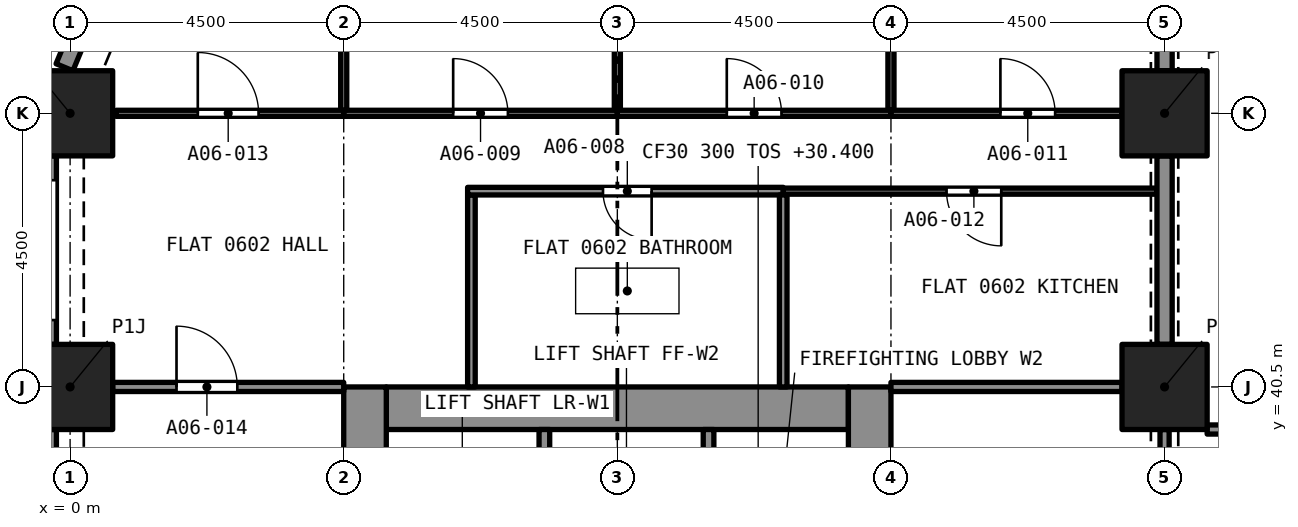
"""IFC4 building model, lengths in metres.
Left out: names, types, materials, properties, quantities, classifications, styles, units other than length and angle.
Written with IfcOpenShell. Run it as: python <this file> out.ifc"""

import sys

from ifc_helpers import new_model, si_unit, direction, frame, frame_2d, origin, origin_2d, place, context, subcontext, project, spatial, rectangle, extrude, element, fill, save


model = new_model("IFC4")
c1 = context("Model", 3, precision=1e-05, world=origin(), true_north=direction((0.0, 1.0)))
c2 = subcontext(c1, "Body", "Model", "MODEL_VIEW")
j1 = project(units=[si_unit("LENGTHUNIT", "METRE"), si_unit("PLANEANGLEUNIT", "RADIAN")], contexts=[c1])
p1 = place(None, origin())
s1 = spatial("IfcSite", under=j1, at=p1, CompositionType="ELEMENT")
p2 = place(p1, origin())
s2 = spatial("IfcBuilding", under=s1, at=p2, CompositionType="ELEMENT")
p3 = place(p2, frame((0.0, 0.0, 30.4)))
s3 = spatial("IfcBuildingStorey", under=s2, at=p3, CompositionType="ELEMENT", Elevation=30.4)
for number, where, z_axis, x_axis in (
    (1, (0.0, 40.5, 0.0), (0.0, 0.0, 1.0), (1.0, 0.0, 0.0)),
    (2, (18.0, 40.5, 0.0), (0.0, 0.0, 1.0), (1.0, 0.0, 0.0)),
    (3, (0.0, 45.0, 0.0), (0.0, 0.0, 1.0), (1.0, 0.0, 0.0)),
    (4, (18.0, 45.0, 0.0), (0.0, 0.0, 1.0), (1.0, 0.0, 0.0)),
):
    element("IfcColumn", number, at=place(p3, frame(where, z_axis=z_axis, x_axis=x_axis)), inside=s3, PredefinedType="COLUMN", context=c2, shape_type="SweptSolid", body=[
        extrude(rectangle(XDim=1.4, YDim=1.4, at=origin_2d()), origin(), (0.0, 0.0, 1.0), 3.2),
    ])
p4 = place(p3, frame((5.2, 40.15, 0.0), z_axis=(0.0, 0.0, 1.0), x_axis=(1.0, 0.0, 0.0)))
e5 = element("IfcWall", 5, at=p4, inside=s3, PredefinedType="SOLIDWALL", context=c2, shape_type="SweptSolid", body=[
    extrude(rectangle(XDim=7.6, YDim=0.7, at=frame_2d((3.8, 0.0))), origin(), (0.0, 0.0, 1.0), 3.2),
])
p5 = place(p3, frame((4.85, 27.0, 0.0), z_axis=(0.0, 0.0, 1.0), x_axis=(0.0, 1.0, 0.0)))
e6 = element("IfcWall", 6, at=p5, inside=s3, PredefinedType="SOLIDWALL", context=c2, shape_type="SweptSolid", body=[
    extrude(rectangle(XDim=13.5, YDim=0.7, at=frame_2d((6.75, 0.0))), origin(), (0.0, 0.0, 1.0), 3.2),
])
p6 = place(p5, frame((8.95, 0.0, 0.0)))
e7 = element("IfcOpeningElement", 7, at=p6, cuts=e6, PredefinedType="OPENING", context=c2, shape_type="SweptSolid", body=[
    extrude(rectangle(XDim=1.2, YDim=2.1, at=frame_2d((0.6, 1.05))), frame((0.0, 0.36, 0.0), z_axis=(0.0, -1.0, 0.0), x_axis=(1.0, 0.0, 0.0)), (0.0, 0.0, 1.0), 0.72),
])
p7 = place(p3, frame((13.15, 27.0, 0.0), z_axis=(0.0, 0.0, 1.0), x_axis=(0.0, 1.0, 0.0)))
e8 = element("IfcWall", 8, at=p7, inside=s3, PredefinedType="SOLIDWALL", context=c2, shape_type="SweptSolid", body=[
    extrude(rectangle(XDim=13.5, YDim=0.7, at=frame_2d((6.75, 0.0))), origin(), (0.0, 0.0, 1.0), 3.2),
])
p8 = place(p7, frame((11.1, 0.0, 0.0)))
e9 = element("IfcOpeningElement", 9, at=p8, cuts=e8, PredefinedType="OPENING", context=c2, shape_type="SweptSolid", body=[
    extrude(rectangle(XDim=1.1, YDim=2.1, at=frame_2d((0.55, 1.05))), frame((0.0, 0.36, 0.0), z_axis=(0.0, -1.0, 0.0), x_axis=(1.0, 0.0, 0.0)), (0.0, 0.0, 1.0), 0.72),
])
p9 = place(p7, frame((8.95, 0.0, 0.0)))
e10 = element("IfcOpeningElement", 10, at=p9, cuts=e8, PredefinedType="OPENING", context=c2, shape_type="SweptSolid", body=[
    extrude(rectangle(XDim=1.2, YDim=2.1, at=frame_2d((0.6, 1.05))), frame((0.0, 0.36, 0.0), z_axis=(0.0, -1.0, 0.0), x_axis=(1.0, 0.0, 0.0)), (0.0, 0.0, 1.0), 0.72),
])
p10 = place(p3, frame((-0.092, 45.757, 0.0), z_axis=(0.0, 0.0, 1.0), x_axis=(0.382737135771, 0.923857286003, 0.0)))
e11 = element("IfcWall", 11, at=p10, inside=s3, PredefinedType="SOLIDWALL", context=c2, shape_type="SweptSolid", body=[
    extrude(rectangle(XDim=1.865, YDim=0.3, at=frame_2d((0.933, 0.0))), origin(), (0.0, 0.0, 1.0), 3.2),
])
p11 = place(p10, frame((0.508, 0.0, 0.45)))
e12 = element("IfcOpeningElement", 12, at=p11, cuts=e11, PredefinedType="OPENING", context=c2, shape_type="SweptSolid", body=[
    extrude(rectangle(XDim=1.1, YDim=1.95, at=frame_2d((0.55, 0.975))), frame((0.0, 0.16, 0.0), z_axis=(0.0, -1.0, 0.0), x_axis=(1.0, 0.0, 0.0)), (0.0, 0.0, 1.0), 0.32),
])
p12 = place(p3, frame((-0.375, 41.2, 0.0), z_axis=(0.0, 0.0, 1.0), x_axis=(0.0, 1.0, 0.0)))
e13 = element("IfcWall", 13, at=p12, inside=s3, PredefinedType="SOLIDWALL", context=c2, shape_type="SweptSolid", body=[
    extrude(rectangle(XDim=3.1, YDim=0.3, at=frame_2d((1.55, 0.0))), origin(), (0.0, 0.0, 1.0), 3.2),
])
p13 = place(p12, frame((0.4, 0.0, 0.45)))
e14 = element("IfcOpeningElement", 14, at=p13, cuts=e13, PredefinedType="OPENING", context=c2, shape_type="SweptSolid", body=[
    extrude(rectangle(XDim=2.3, YDim=1.95, at=frame_2d((1.15, 0.975))), frame((0.0, 0.16, 0.0), z_axis=(0.0, -1.0, 0.0), x_axis=(1.0, 0.0, 0.0)), (0.0, 0.0, 1.0), 0.32),
])
p14 = place(p3, frame((-0.375, 36.7, 0.0), z_axis=(0.0, 0.0, 1.0), x_axis=(0.0, 1.0, 0.0)))
e15 = element("IfcWall", 15, at=p14, inside=s3, PredefinedType="SOLIDWALL", context=c2, shape_type="SweptSolid", body=[
    extrude(rectangle(XDim=3.1, YDim=0.3, at=frame_2d((1.55, 0.0))), origin(), (0.0, 0.0, 1.0), 3.2),
])
p15 = place(p14, frame((0.4, 0.0, 0.45)))
e16 = element("IfcOpeningElement", 16, at=p15, cuts=e15, PredefinedType="OPENING", context=c2, shape_type="SweptSolid", body=[
    extrude(rectangle(XDim=2.3, YDim=1.95, at=frame_2d((1.15, 0.975))), frame((0.0, 0.16, 0.0), z_axis=(0.0, -1.0, 0.0), x_axis=(1.0, 0.0, 0.0)), (0.0, 0.0, 1.0), 0.32),
])
p16 = place(p3, frame((6.6, 40.5, 0.0), z_axis=(0.0, 0.0, 1.0), x_axis=(0.0, 1.0, 0.0)))
e17 = element("IfcWall", 17, at=p16, inside=s3, PredefinedType="PARTITIONING", context=c2, shape_type="SweptSolid", body=[
    extrude(rectangle(XDim=3.157, YDim=0.125, at=frame_2d((1.579, 0.0))), origin(), (0.0, 0.0, 1.0), 2.9),
])
p17 = place(p3, frame((11.728, 43.72, 0.0), z_axis=(0.0, 0.0, 1.0), x_axis=(-1.0, 0.0, 0.0)))
e18 = element("IfcWall", 18, at=p17, inside=s3, PredefinedType="PARTITIONING", context=c2, shape_type="SweptSolid", body=[
    extrude(rectangle(XDim=5.19, YDim=0.125, at=frame_2d((2.595, 0.0))), origin(), (0.0, 0.0, 1.0), 2.9),
])
p18 = place(p17, frame((2.164, 0.0, 0.0)))
e19 = element("IfcOpeningElement", 19, at=p18, cuts=e18, PredefinedType="OPENING", context=c2, shape_type="SweptSolid", body=[
    extrude(rectangle(XDim=0.8, YDim=2.1, at=frame_2d((0.4, 1.05))), frame((0.0, 0.073, 0.0), z_axis=(0.0, -1.0, 0.0), x_axis=(1.0, 0.0, 0.0)), (0.0, 0.0, 1.0), 0.145),
])
p19 = place(p3, frame((11.728, 40.5, 0.0), z_axis=(0.0, 0.0, 1.0), x_axis=(0.0, 1.0, 0.0)))
e20 = element("IfcWall", 20, at=p19, inside=s3, PredefinedType="PARTITIONING", context=c2, shape_type="SweptSolid", body=[
    extrude(rectangle(XDim=3.157, YDim=0.125, at=frame_2d((1.579, 0.0))), origin(), (0.0, 0.0, 1.0), 2.9),
])
p20 = place(p3, frame((9.0, 45.05, 0.0), z_axis=(0.0, 0.0, 1.0), x_axis=(0.0, 1.0, 0.0)))
e21 = element("IfcWall", 21, at=p20, inside=s3, PredefinedType="PARTITIONING", context=c2, shape_type="SweptSolid", body=[
    extrude(rectangle(XDim=3.75, YDim=0.1, at=frame_2d((1.875, 0.0))), origin(), (0.0, 0.0, 1.0), 2.9),
])
p21 = place(p3, frame((4.5, 45.0, 0.0), z_axis=(0.0, 0.0, 1.0), x_axis=(1.0, 0.0, 0.0)))
e22 = element("IfcWall", 22, at=p21, inside=s3, PredefinedType="PARTITIONING", context=c2, shape_type="SweptSolid", body=[
    extrude(rectangle(XDim=4.5, YDim=0.1, at=frame_2d((2.25, 0.0))), origin(), (0.0, 0.0, 1.0), 2.9),
])
p22 = place(p21, frame((1.8, 0.0, 0.0)))
e23 = element("IfcOpeningElement", 23, at=p22, cuts=e22, PredefinedType="OPENING", context=c2, shape_type="SweptSolid", body=[
    extrude(rectangle(XDim=0.9, YDim=2.1, at=frame_2d((0.45, 1.05))), frame((0.0, 0.06, 0.0), z_axis=(0.0, -1.0, 0.0), x_axis=(1.0, 0.0, 0.0)), (0.0, 0.0, 1.0), 0.12),
])
p23 = place(p3, frame((4.5, 45.05, 0.0), z_axis=(0.0, 0.0, 1.0), x_axis=(0.0, 1.0, 0.0)))
e24 = element("IfcWall", 24, at=p23, inside=s3, PredefinedType="PARTITIONING", context=c2, shape_type="SweptSolid", body=[
    extrude(rectangle(XDim=3.692, YDim=0.1, at=frame_2d((1.846, 0.0))), origin(), (0.0, 0.0, 1.0), 2.9),
])
p24 = place(p3, frame((13.5, 45.05, 0.0), z_axis=(0.0, 0.0, 1.0), x_axis=(0.0, 1.0, 0.0)))
e25 = element("IfcWall", 25, at=p24, inside=s3, PredefinedType="PARTITIONING", context=c2, shape_type="SweptSolid", body=[
    extrude(rectangle(XDim=3.75, YDim=0.1, at=frame_2d((1.875, 0.0))), origin(), (0.0, 0.0, 1.0), 2.9),
])
p25 = place(p3, frame((9.0, 45.0, 0.0), z_axis=(0.0, 0.0, 1.0), x_axis=(1.0, 0.0, 0.0)))
e26 = element("IfcWall", 26, at=p25, inside=s3, PredefinedType="PARTITIONING", context=c2, shape_type="SweptSolid", body=[
    extrude(rectangle(XDim=4.5, YDim=0.1, at=frame_2d((2.25, 0.0))), origin(), (0.0, 0.0, 1.0), 2.9),
])
p26 = place(p25, frame((1.8, 0.0, 0.0)))
e27 = element("IfcOpeningElement", 27, at=p26, cuts=e26, PredefinedType="OPENING", context=c2, shape_type="SweptSolid", body=[
    extrude(rectangle(XDim=0.9, YDim=2.1, at=frame_2d((0.45, 1.05))), frame((0.0, 0.06, 0.0), z_axis=(0.0, -1.0, 0.0), x_axis=(1.0, 0.0, 0.0)), (0.0, 0.0, 1.0), 0.12),
])
p27 = place(p3, frame((13.5, 45.0, 0.0), z_axis=(0.0, 0.0, 1.0), x_axis=(1.0, 0.0, 0.0)))
e28 = element("IfcWall", 28, at=p27, inside=s3, PredefinedType="PARTITIONING", context=c2, shape_type="SweptSolid", body=[
    extrude(rectangle(XDim=3.8, YDim=0.1, at=frame_2d((1.9, 0.0))), origin(), (0.0, 0.0, 1.0), 2.9),
])
p28 = place(p27, frame((1.8, 0.0, 0.0)))
e29 = element("IfcOpeningElement", 29, at=p28, cuts=e28, PredefinedType="OPENING", context=c2, shape_type="SweptSolid", body=[
    extrude(rectangle(XDim=0.9, YDim=2.1, at=frame_2d((0.45, 1.05))), frame((0.0, 0.06, 0.0), z_axis=(0.0, -1.0, 0.0), x_axis=(1.0, 0.0, 0.0)), (0.0, 0.0, 1.0), 0.12),
])
p29 = place(p3, frame((18.0, 45.7, 0.0), z_axis=(0.0, 0.0, 1.0), x_axis=(0.0, 1.0, 0.0)))
e30 = element("IfcWall", 30, at=p29, inside=s3, PredefinedType="PARTITIONING", context=c2, shape_type="SweptSolid", body=[
    extrude(rectangle(XDim=3.1, YDim=0.25, at=frame_2d((1.55, 0.0))), origin(), (0.0, 0.0, 1.0), 2.38),
])
p30 = place(p3, frame((17.875, 43.72, 0.0), z_axis=(0.0, 0.0, 1.0), x_axis=(-1.0, 0.0, 0.0)))
e31 = element("IfcWall", 31, at=p30, inside=s3, PredefinedType="PARTITIONING", context=c2, shape_type="SweptSolid", body=[
    extrude(rectangle(XDim=6.147, YDim=0.1, at=frame_2d((3.073, 0.0))), origin(), (0.0, 0.0, 1.0), 2.9),
])
p31 = place(p30, frame((2.561, 0.0, 0.0)))
e32 = element("IfcOpeningElement", 32, at=p31, cuts=e31, PredefinedType="OPENING", context=c2, shape_type="SweptSolid", body=[
    extrude(rectangle(XDim=0.9, YDim=2.1, at=frame_2d((0.45, 1.05))), frame((0.0, 0.06, 0.0), z_axis=(0.0, -1.0, 0.0), x_axis=(1.0, 0.0, 0.0)), (0.0, 0.0, 1.0), 0.12),
])
p32 = place(p3, frame((0.758, 45.0, 0.0), z_axis=(0.0, 0.0, 1.0), x_axis=(1.0, 0.0, 0.0)))
e33 = element("IfcWall", 33, at=p32, inside=s3, PredefinedType="PARTITIONING", context=c2, shape_type="SweptSolid", body=[
    extrude(rectangle(XDim=3.742, YDim=0.1, at=frame_2d((1.871, 0.0))), origin(), (0.0, 0.0, 1.0), 2.9),
])
p33 = place(p32, frame((1.342, 0.0, 0.0)))
e34 = element("IfcOpeningElement", 34, at=p33, cuts=e33, PredefinedType="OPENING", context=c2, shape_type="SweptSolid", body=[
    extrude(rectangle(XDim=1.0, YDim=2.1, at=frame_2d((0.5, 1.05))), frame((0.0, 0.06, 0.0), z_axis=(0.0, -1.0, 0.0), x_axis=(1.0, 0.0, 0.0)), (0.0, 0.0, 1.0), 0.12),
])
p34 = place(p3, frame((0.7, 40.5, 0.0), z_axis=(0.0, 0.0, 1.0), x_axis=(1.0, 0.0, 0.0)))
e35 = element("IfcWall", 35, at=p34, inside=s3, PredefinedType="PARTITIONING", context=c2, shape_type="SweptSolid", body=[
    extrude(rectangle(XDim=3.8, YDim=0.15, at=frame_2d((1.9, 0.0))), origin(), (0.0, 0.0, 1.0), 2.9),
])
p35 = place(p34, frame((1.05, 0.0, 0.0)))
e36 = element("IfcOpeningElement", 36, at=p35, cuts=e35, PredefinedType="OPENING", context=c2, shape_type="SweptSolid", body=[
    extrude(rectangle(XDim=1.0, YDim=2.1, at=frame_2d((0.5, 1.05))), frame((0.0, 0.085, 0.0), z_axis=(0.0, -1.0, 0.0), x_axis=(1.0, 0.0, 0.0)), (0.0, 0.0, 1.0), 0.17),
])
p36 = place(p3, frame((18.0, 41.2, 0.0), z_axis=(0.0, 0.0, 1.0), x_axis=(0.0, 1.0, 0.0)))
e37 = element("IfcWall", 37, at=p36, inside=s3, PredefinedType="PARTITIONING", context=c2, shape_type="SweptSolid", body=[
    extrude(rectangle(XDim=3.1, YDim=0.25, at=frame_2d((1.55, 0.0))), origin(), (0.0, 0.0, 1.0), 2.38),
])
p37 = place(p3, frame((13.5, 40.5, 0.0), z_axis=(0.0, 0.0, 1.0), x_axis=(1.0, 0.0, 0.0)))
e38 = element("IfcWall", 38, at=p37, inside=s3, PredefinedType="PARTITIONING", context=c2, shape_type="SweptSolid", body=[
    extrude(rectangle(XDim=3.8, YDim=0.15, at=frame_2d((1.9, 0.0))), origin(), (0.0, 0.0, 1.0), 2.9),
])
p38 = place(p3, frame((18.7, 39.8, 0.0), z_axis=(0.0, 0.0, 1.0), x_axis=(1.0, 0.0, 0.0)))
e39 = element("IfcWall", 39, at=p38, inside=s3, PredefinedType="PARTITIONING", context=c2, shape_type="SweptSolid", body=[
    extrude(rectangle(XDim=12.1, YDim=0.15, at=frame_2d((6.05, 0.0))), origin(), (0.0, 0.0, 1.0), 2.75),
])
p39 = place(p38, frame((5.55, 0.0, 0.0)))
e40 = element("IfcOpeningElement", 40, at=p39, cuts=e39, PredefinedType="OPENING", context=c2, shape_type="SweptSolid", body=[
    extrude(rectangle(XDim=1.0, YDim=2.1, at=frame_2d((0.5, 1.05))), frame((0.0, 0.085, 0.0), z_axis=(0.0, -1.0, 0.0), x_axis=(1.0, 0.0, 0.0)), (0.0, 0.0, 1.0), 0.17),
])
p40 = place(p3, frame((18.0, 39.8, 0.0), z_axis=(0.0, 0.0, 1.0), x_axis=(0.0, -1.0, 0.0)))
e41 = element("IfcWall", 41, at=p40, inside=s3, PredefinedType="PARTITIONING", context=c2, shape_type="SweptSolid", body=[
    extrude(rectangle(XDim=3.1, YDim=0.15, at=frame_2d((1.55, 0.0))), origin(), (0.0, 0.0, 1.0), 2.38),
])
p41 = place(p40, frame((0.95, 0.0, 0.0)))
e42 = element("IfcOpeningElement", 42, at=p41, cuts=e41, PredefinedType="OPENING", context=c2, shape_type="SweptSolid", body=[
    extrude(rectangle(XDim=1.2, YDim=2.1, at=frame_2d((0.6, 1.05))), frame((0.0, 0.085, 0.0), z_axis=(0.0, -1.0, 0.0), x_axis=(1.0, 0.0, 0.0)), (0.0, 0.0, 1.0), 0.17),
])
p42 = place(p3, frame((7.8, 37.5, 0.0), z_axis=(0.0, 0.0, 1.0), x_axis=(0.0, 1.0, 0.0)))
e43 = element("IfcWall", 43, at=p42, inside=s3, PredefinedType="SOLIDWALL", context=c2, shape_type="SweptSolid", body=[
    extrude(rectangle(XDim=2.3, YDim=0.175, at=frame_2d((1.15, 0.0))), origin(), (0.0, 0.0, 1.0), 2.9),
])
p43 = place(p3, frame((10.5, 37.5, 0.0), z_axis=(0.0, 0.0, 1.0), x_axis=(0.0, 1.0, 0.0)))
e44 = element("IfcWall", 44, at=p43, inside=s3, PredefinedType="SOLIDWALL", context=c2, shape_type="SweptSolid", body=[
    extrude(rectangle(XDim=2.3, YDim=0.175, at=frame_2d((1.15, 0.0))), origin(), (0.0, 0.0, 1.0), 2.9),
])
p44 = place(p43, frame((0.65, 0.0, 0.0)))
e45 = element("IfcOpeningElement", 45, at=p44, cuts=e44, PredefinedType="OPENING", context=c2, shape_type="SweptSolid", body=[
    extrude(rectangle(XDim=1.0, YDim=2.1, at=frame_2d((0.5, 1.05))), frame((0.0, 0.097, 0.0), z_axis=(0.0, -1.0, 0.0), x_axis=(1.0, 0.0, 0.0)), (0.0, 0.0, 1.0), 0.195),
])
p45 = place(p18, origin())
e46 = element("IfcDoor", 46, at=p45, inside=s3, OperationType="SINGLE_SWING_LEFT", PredefinedType="DOOR", context=c2, shape_type="SweptSolid", body=[
    extrude(rectangle(XDim=0.8, YDim=2.1, at=frame_2d((0.4, 1.05))), frame((0.0, 0.025, 0.0), z_axis=(0.0, -1.0, 0.0), x_axis=(1.0, 0.0, 0.0)), (0.0, 0.0, 1.0), 0.05),
])
fill(e19, e46)
p46 = place(p22, origin())
e47 = element("IfcDoor", 47, at=p46, inside=s3, OperationType="SINGLE_SWING_RIGHT", PredefinedType="DOOR", context=c2, shape_type="SweptSolid", body=[
    extrude(rectangle(XDim=0.9, YDim=2.1, at=frame_2d((0.45, 1.05))), frame((0.0, 0.025, 0.0), z_axis=(0.0, -1.0, 0.0), x_axis=(1.0, 0.0, 0.0)), (0.0, 0.0, 1.0), 0.05),
])
fill(e23, e47)
p47 = place(p26, origin())
e48 = element("IfcDoor", 48, at=p47, inside=s3, OperationType="SINGLE_SWING_LEFT", PredefinedType="DOOR", context=c2, shape_type="SweptSolid", body=[
    extrude(rectangle(XDim=0.9, YDim=2.1, at=frame_2d((0.45, 1.05))), frame((0.0, 0.025, 0.0), z_axis=(0.0, -1.0, 0.0), x_axis=(1.0, 0.0, 0.0)), (0.0, 0.0, 1.0), 0.05),
])
fill(e27, e48)
p48 = place(p28, origin())
e49 = element("IfcDoor", 49, at=p48, inside=s3, OperationType="SINGLE_SWING_RIGHT", PredefinedType="DOOR", context=c2, shape_type="SweptSolid", body=[
    extrude(rectangle(XDim=0.9, YDim=2.1, at=frame_2d((0.45, 1.05))), frame((0.0, 0.025, 0.0), z_axis=(0.0, -1.0, 0.0), x_axis=(1.0, 0.0, 0.0)), (0.0, 0.0, 1.0), 0.05),
])
fill(e29, e49)
p49 = place(p31, origin())
e50 = element("IfcDoor", 50, at=p49, inside=s3, OperationType="SINGLE_SWING_LEFT", PredefinedType="DOOR", context=c2, shape_type="SweptSolid", body=[
    extrude(rectangle(XDim=0.9, YDim=2.1, at=frame_2d((0.45, 1.05))), frame((0.0, 0.025, 0.0), z_axis=(0.0, -1.0, 0.0), x_axis=(1.0, 0.0, 0.0)), (0.0, 0.0, 1.0), 0.05),
])
fill(e32, e50)
p50 = place(p33, origin())
e51 = element("IfcDoor", 51, at=p50, inside=s3, OperationType="SINGLE_SWING_LEFT", PredefinedType="DOOR", context=c2, shape_type="SweptSolid", body=[
    extrude(rectangle(XDim=1.0, YDim=2.1, at=frame_2d((0.5, 1.05))), frame((0.0, 0.025, 0.0), z_axis=(0.0, -1.0, 0.0), x_axis=(1.0, 0.0, 0.0)), (0.0, 0.0, 1.0), 0.05),
])
fill(e34, e51)
p51 = place(p35, origin())
e52 = element("IfcDoor", 52, at=p51, inside=s3, OperationType="SINGLE_SWING_LEFT", PredefinedType="DOOR", context=c2, shape_type="SweptSolid", body=[
    extrude(rectangle(XDim=1.0, YDim=2.1, at=frame_2d((0.5, 1.05))), frame((0.0, 0.025, 0.0), z_axis=(0.0, -1.0, 0.0), x_axis=(1.0, 0.0, 0.0)), (0.0, 0.0, 1.0), 0.05),
])
fill(e36, e52)
save(model, sys.argv[1])
